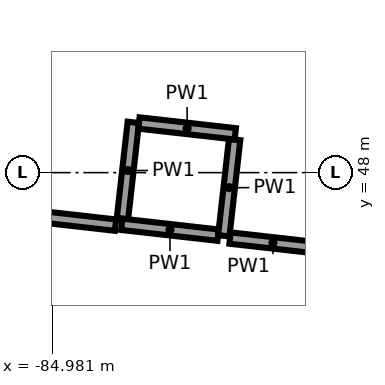
"""IFC4 building model, lengths in metres.
Left out: names, types, materials, properties, quantities, classifications, styles, units other than length and angle.
Written with IfcOpenShell. Run it as: python <this file> out.ifc"""

import sys

from ifc_helpers import new_model, si_unit, direction, frame, frame_2d, origin, place, context, subcontext, project, spatial, rectangle, extrude, element, save


model = new_model("IFC4")
c1 = context("Model", 3, precision=1e-05, world=origin(), true_north=direction((0.0, 1.0)))
c2 = subcontext(c1, "Body", "Model", "MODEL_VIEW")
j1 = project(units=[si_unit("LENGTHUNIT", "METRE"), si_unit("PLANEANGLEUNIT", "RADIAN")], contexts=[c1])
p1 = place(None, origin())
s1 = spatial("IfcSite", under=j1, at=p1, CompositionType="ELEMENT")
p2 = place(p1, origin())
s2 = spatial("IfcBuilding", under=s1, at=p2, CompositionType="ELEMENT")
p3 = place(p2, frame((0.0, 0.0, 6.5)))
s3 = spatial("IfcBuildingStorey", under=s2, at=p3, CompositionType="ELEMENT", Elevation=6.5)
for number, where, z_axis, x_axis in (
    (1, (-83.913, 48.662, 0.0), (0.0, 0.0, 1.0), (-0.112, -0.994, 0.0)),
    (2, (-84.064, 47.32, 0.0), (0.0, 0.0, 1.0), (0.994, -0.112, 0.0)),
):
    element("IfcWall", number, at=place(p3, frame(where, z_axis=z_axis, x_axis=x_axis)), inside=s3, PredefinedType="PARTITIONING", context=c2, shape_type="SweptSolid", body=[
        extrude(rectangle(XDim=1.275, YDim=0.15, at=frame_2d((0.638, 0.0))), origin(), (0.0, 0.0, 1.0), 5.15),
    ])
for number, where, z_axis, x_axis in (
    (3, (-82.723, 47.169, 0.0), (0.0, 0.0, 1.0), (0.112, 0.994, 0.0)),
    (4, (-82.572, 48.51, 0.0), (0.0, 0.0, 1.0), (-0.994, 0.112, 0.0)),
):
    element("IfcWall", number, at=place(p3, frame(where, z_axis=z_axis, x_axis=x_axis)), inside=s3, PredefinedType="PARTITIONING", context=c2, shape_type="SweptSolid", body=[
        extrude(rectangle(XDim=1.275, YDim=0.15, at=frame_2d((0.637, 0.0))), origin(), (0.0, 0.0, 1.0), 5.15),
    ])
p4 = place(p3, frame((-87.827, 47.724, 0.0), z_axis=(0.0, 0.0, 1.0), x_axis=(0.993708869306, -0.11199412066, 0.0)))
e5 = element("IfcWall", 5, at=p4, inside=s3, PredefinedType="PARTITIONING", context=c2, shape_type="SweptSolid", body=[
    extrude(rectangle(XDim=3.704, YDim=0.15, at=frame_2d((1.852, 0.0))), origin(), (0.0, 0.0, 1.0), 4.05),
])
p5 = place(p4, frame((0.65, 0.0, 0.0)))
e6 = element("IfcOpeningElement", 6, at=p5, cuts=e5, PredefinedType="OPENING", context=c2, shape_type="SweptSolid", body=[
    extrude(rectangle(XDim=1.8, YDim=2.1, at=frame_2d((0.9, 1.05))), frame((0.0, 0.085, 0.0), z_axis=(0.0, -1.0, 0.0), x_axis=(1.0, 0.0, 0.0)), (0.0, 0.0, 1.0), 0.17),
])
p6 = place(p3, frame((-82.641, 47.139, 0.0), z_axis=(0.0, 0.0, 1.0), x_axis=(0.993725340882, -0.111847873866, 0.0)))
e7 = element("IfcWall", 7, at=p6, inside=s3, PredefinedType="PARTITIONING", context=c2, shape_type="SweptSolid", body=[
    extrude(rectangle(XDim=1.135, YDim=0.15, at=frame_2d((0.567, 0.0))), origin(), (0.0, 0.0, 1.0), 5.15),
])
save(model, sys.argv[1])
